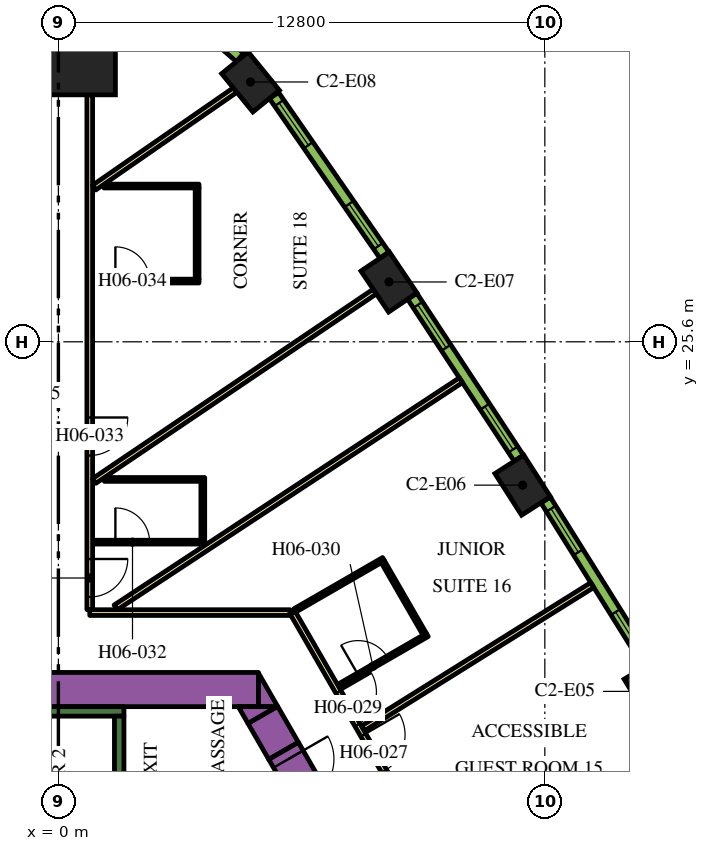
"""IFC4 building model, lengths in metres.
Left out: names, types, materials, properties, quantities, classifications, styles, units other than length and angle.
Written with IfcOpenShell. Run it as: python <this file> out.ifc"""

import sys

from ifc_helpers import new_model, si_unit, direction, frame, frame_2d, origin, origin_2d, place, context, subcontext, project, spatial, polyline, rectangle, outline, extrude, element, fill, save


model = new_model("IFC4")
c1 = context("Model", 3, precision=1e-05, world=origin(), true_north=direction((0.0, 1.0)))
c2 = subcontext(c1, "Body", "Model", "MODEL_VIEW")
j1 = project(units=[si_unit("LENGTHUNIT", "METRE"), si_unit("PLANEANGLEUNIT", "RADIAN")], contexts=[c1])
p1 = place(None, origin())
s1 = spatial("IfcSite", under=j1, at=p1, CompositionType="ELEMENT")
p2 = place(p1, origin())
s2 = spatial("IfcBuilding", under=s1, at=p2, CompositionType="ELEMENT")
p3 = place(p2, frame((0.0, 0.0, 83.7)))
s3 = spatial("IfcBuildingStorey", under=s2, at=p3, CompositionType="ELEMENT", Elevation=83.7)
p4 = place(p3, frame((0.0, 33.598, 0.0), z_axis=(0.0, 0.0, 1.0), x_axis=(0.0, 1.0, 0.0)))
e1 = element("IfcColumn", 1, at=p4, inside=s3, PredefinedType="COLUMN", context=c2, shape_type="SweptSolid", body=[
    extrude(rectangle(XDim=3.0, YDim=3.0, at=origin_2d()), origin(), (0.0, 0.0, 1.0), 3.9),
])
for number, where, z_axis, x_axis in (
    (2, (15.609, 16.402, 0.0), (0.0, 0.0, 1.0), (-0.52, 0.854, 0.0)),
    (3, (12.217, 21.828, 0.0), (0.0, 0.0, 1.0), (-0.54, 0.842, 0.0)),
    (4, (8.699, 27.174, 0.0), (0.0, 0.0, 1.0), (-0.559, 0.829, 0.0)),
    (5, (5.056, 32.437, 0.0), (0.0, 0.0, 1.0), (-0.632, 0.775, 0.0)),
):
    element("IfcColumn", number, at=place(p3, frame(where, z_axis=z_axis, x_axis=x_axis)), inside=s3, PredefinedType="COLUMN", context=c2, shape_type="SweptSolid", body=[
        extrude(rectangle(XDim=1.3, YDim=0.9, at=origin_2d()), origin(), (0.0, 0.0, 1.0), 3.9),
    ])
p5 = place(p3, frame((-4.224, 16.45, 0.0), z_axis=(0.0, 0.0, 1.0), x_axis=(1.0, 0.0, 0.0)))
e6 = element("IfcWall", 6, at=p5, inside=s3, PredefinedType="SOLIDWALL", context=c2, shape_type="SweptSolid", body=[
    extrude(rectangle(XDim=9.488, YDim=0.9, at=frame_2d((4.744, 0.0))), origin(), (0.0, 0.0, 1.0), 3.9),
])
p6 = place(p3, origin())
e7 = element("IfcWall", 7, at=p6, inside=s3, PredefinedType="SOLIDWALL", context=c2, shape_type="SweptSolid", body=[
    extrude(outline(polyline([(5.265, 16.0), (5.265, 16.88), (5.773, 16.0), (5.265, 16.0)])), origin(), (0.0, 0.0, 1.0), 3.9),
])
p7 = place(p3, frame((5.926, 14.836, 0.0), z_axis=(0.0, 0.0, 1.0), x_axis=(-0.500076735116, 0.865981096212, 0.0)))
e8 = element("IfcWall", 8, at=p7, inside=s3, PredefinedType="SOLIDWALL", context=c2, shape_type="SweptSolid", body=[
    extrude(rectangle(XDim=1.094, YDim=0.9, at=frame_2d((0.547, 0.0))), origin(), (0.0, 0.0, 1.0), 3.9),
])
e9 = element("IfcWall", 9, at=p6, inside=s3, PredefinedType="SOLIDWALL", context=c2, shape_type="SweptSolid", body=[
    extrude(outline(polyline([(4.734, 16.0), (5.75, 16.0), (4.988, 15.56), (4.734, 16.0)])), origin(), (0.0, 0.0, 1.0), 3.9),
])
p8 = place(p3, frame((-1.725, 15.875, 0.0), z_axis=(0.0, 0.0, 1.0), x_axis=(1.0, 0.0, 0.0)))
e10 = element("IfcWall", 10, at=p8, inside=s3, PredefinedType="SOLIDWALL", context=c2, shape_type="SweptSolid", body=[
    extrude(rectangle(XDim=3.45, YDim=0.25, at=frame_2d((1.725, 0.0))), origin(), (0.0, 0.0, 1.0), 3.9),
])
p9 = place(p3, frame((1.6, 8.95, 0.0), z_axis=(0.0, 0.0, 1.0), x_axis=(0.0, 1.0, 0.0)))
e11 = element("IfcWall", 11, at=p9, inside=s3, PredefinedType="SOLIDWALL", context=c2, shape_type="SweptSolid", body=[
    extrude(rectangle(XDim=6.8, YDim=0.25, at=frame_2d((3.4, 0.0))), origin(), (0.0, 0.0, 1.0), 3.9),
])
p10 = place(p3, frame((5.926, 14.836, 0.0), z_axis=(0.0, 0.0, 1.0), x_axis=(0.500062241894, -0.865989465428, 0.0)))
e12 = element("IfcWall", 12, at=p10, inside=s3, PredefinedType="SOLIDWALL", context=c2, shape_type="SweptSolid", body=[
    extrude(rectangle(XDim=1.7, YDim=0.9, at=frame_2d((0.85, 0.0))), origin(), (0.0, 0.0, 1.0), 3.9),
])
p11 = place(p10, frame((0.25, 0.0, 0.0)))
e13 = element("IfcOpeningElement", 13, at=p11, cuts=e12, PredefinedType="OPENING", context=c2, shape_type="SweptSolid", body=[
    extrude(rectangle(XDim=1.2, YDim=2.1, at=frame_2d((0.6, 1.05))), frame((0.0, 0.46, 0.0), z_axis=(0.0, -1.0, 0.0), x_axis=(1.0, 0.0, 0.0)), (0.0, 0.0, 1.0), 0.92),
])
p12 = place(p3, frame((6.163, 18.475, 0.0), z_axis=(0.0, 0.0, 1.0), x_axis=(0.500001317485, -0.866024643133, 0.0)))
e14 = element("IfcWall", 14, at=p12, inside=s3, PredefinedType="PARTITIONING", context=c2, shape_type="SweptSolid", body=[
    extrude(rectangle(XDim=25.767, YDim=0.15, at=frame_2d((12.883, 0.0))), origin(), (0.0, 0.0, 1.0), 2.75),
])
p13 = place(p12, frame((24.241, 0.0, 0.0)))
e15 = element("IfcOpeningElement", 15, at=p13, cuts=e14, PredefinedType="OPENING", context=c2, shape_type="SweptSolid", body=[
    extrude(rectangle(XDim=1.0, YDim=2.1, at=frame_2d((0.5, 1.05))), frame((0.0, 0.085, 0.0), z_axis=(0.0, -1.0, 0.0), x_axis=(1.0, 0.0, 0.0)), (0.0, 0.0, 1.0), 0.17),
])
p14 = place(p12, frame((13.144, 0.0, 0.0)))
e16 = element("IfcOpeningElement", 16, at=p14, cuts=e14, PredefinedType="OPENING", context=c2, shape_type="SweptSolid", body=[
    extrude(rectangle(XDim=1.0, YDim=2.1, at=frame_2d((0.5, 1.05))), frame((0.0, 0.085, 0.0), z_axis=(0.0, -1.0, 0.0), x_axis=(1.0, 0.0, 0.0)), (0.0, 0.0, 1.0), 0.17),
])
p15 = place(p12, frame((10.874, 0.0, 0.0)))
e17 = element("IfcOpeningElement", 17, at=p15, cuts=e14, PredefinedType="OPENING", context=c2, shape_type="SweptSolid", body=[
    extrude(rectangle(XDim=0.9, YDim=2.1, at=frame_2d((0.45, 1.05))), frame((0.0, 0.085, 0.0), z_axis=(0.0, -1.0, 0.0), x_axis=(1.0, 0.0, 0.0)), (0.0, 0.0, 1.0), 0.17),
])
p16 = place(p12, frame((3.718, 0.0, 0.0)))
e18 = element("IfcOpeningElement", 18, at=p16, cuts=e14, PredefinedType="OPENING", context=c2, shape_type="SweptSolid", body=[
    extrude(rectangle(XDim=1.1, YDim=2.1, at=frame_2d((0.55, 1.05))), frame((0.0, 0.085, 0.0), z_axis=(0.0, -1.0, 0.0), x_axis=(1.0, 0.0, 0.0)), (0.0, 0.0, 1.0), 0.17),
])
p17 = place(p12, frame((2.411, 0.0, 0.0)))
e19 = element("IfcOpeningElement", 19, at=p17, cuts=e14, PredefinedType="OPENING", context=c2, shape_type="SweptSolid", body=[
    extrude(rectangle(XDim=1.0, YDim=2.1, at=frame_2d((0.5, 1.05))), frame((0.0, 0.085, 0.0), z_axis=(0.0, -1.0, 0.0), x_axis=(1.0, 0.0, 0.0)), (0.0, 0.0, 1.0), 0.17),
])
p18 = place(p3, frame((0.825, 18.475, 0.0), z_axis=(0.0, 0.0, 1.0), x_axis=(1.0, 0.0, 0.0)))
e20 = element("IfcWall", 20, at=p18, inside=s3, PredefinedType="PARTITIONING", context=c2, shape_type="SweptSolid", body=[
    extrude(rectangle(XDim=5.268, YDim=0.15, at=frame_2d((2.634, 0.0))), origin(), (0.0, 0.0, 1.0), 2.75),
])
p19 = place(p3, frame((0.825, 32.098, 0.0), z_axis=(0.0, 0.0, 1.0), x_axis=(0.0, -1.0, 0.0)))
e21 = element("IfcWall", 21, at=p19, inside=s3, PredefinedType="PARTITIONING", context=c2, shape_type="SweptSolid", body=[
    extrude(rectangle(XDim=13.543, YDim=0.15, at=frame_2d((6.772, 0.0))), origin(), (0.0, 0.0, 1.0), 2.75),
])
p20 = place(p19, frame((12.213, 0.0, 0.0)))
e22 = element("IfcOpeningElement", 22, at=p20, cuts=e21, PredefinedType="OPENING", context=c2, shape_type="SweptSolid", body=[
    extrude(rectangle(XDim=1.0, YDim=2.1, at=frame_2d((0.5, 1.05))), frame((0.0, 0.085, 0.0), z_axis=(0.0, -1.0, 0.0), x_axis=(1.0, 0.0, 0.0)), (0.0, 0.0, 1.0), 0.17),
])
p21 = place(p19, frame((8.49, 0.0, 0.0)))
e23 = element("IfcOpeningElement", 23, at=p21, cuts=e21, PredefinedType="OPENING", context=c2, shape_type="SweptSolid", body=[
    extrude(rectangle(XDim=1.0, YDim=2.1, at=frame_2d((0.5, 1.05))), frame((0.0, 0.085, 0.0), z_axis=(0.0, -1.0, 0.0), x_axis=(1.0, 0.0, 0.0)), (0.0, 0.0, 1.0), 0.17),
])
p22 = place(p3, frame((8.326, 26.923, 0.0), z_axis=(0.0, 0.0, 1.0), x_axis=(-0.828836601893, -0.5594907393, 0.0)))
e24 = element("IfcWall", 24, at=p22, inside=s3, PredefinedType="PARTITIONING", context=c2, shape_type="SweptSolid", body=[
    extrude(rectangle(XDim=8.909, YDim=0.15, at=frame_2d((4.455, 0.0))), origin(), (0.0, 0.0, 1.0), 2.75),
])
p23 = place(p3, frame((10.592, 24.589, 0.0), z_axis=(0.0, 0.0, 1.0), x_axis=(-0.835337323748, -0.549737715236, 0.0)))
e25 = element("IfcWall", 25, at=p23, inside=s3, PredefinedType="PARTITIONING", context=c2, shape_type="SweptSolid", body=[
    extrude(rectangle(XDim=10.875, YDim=0.15, at=frame_2d((5.438, 0.0))), origin(), (0.0, 0.0, 1.0), 2.75),
])
p24 = place(p3, frame((4.649, 32.223, 0.0), z_axis=(0.0, 0.0, 1.0), x_axis=(-0.822262349475, -0.569108626394, 0.0)))
e26 = element("IfcWall", 26, at=p24, inside=s3, PredefinedType="PARTITIONING", context=c2, shape_type="SweptSolid", body=[
    extrude(rectangle(XDim=4.51, YDim=0.15, at=frame_2d((2.255, 0.0))), origin(), (0.0, 0.0, 1.0), 2.75),
])
p25 = place(p3, frame((14.049, 19.2, 0.0), z_axis=(0.0, 0.0, 1.0), x_axis=(-0.847955867271, -0.530066832731, 0.0)))
e27 = element("IfcWall", 27, at=p25, inside=s3, PredefinedType="PARTITIONING", context=c2, shape_type="SweptSolid", body=[
    extrude(rectangle(XDim=7.111, YDim=0.15, at=frame_2d((3.556, 0.0))), origin(), (0.0, 0.0, 1.0), 2.75),
])
p26 = place(p3, frame((7.368, 16.538, 0.0), z_axis=(0.0, 0.0, 1.0), x_axis=(0.866036505625, 0.499980770555, 0.0)))
e28 = element("IfcWall", 28, at=p26, inside=s3, PredefinedType="PARTITIONING", context=c2, shape_type="SweptSolid", body=[
    extrude(rectangle(XDim=2.7, YDim=0.1, at=frame_2d((1.35, 0.0))), origin(), (0.0, 0.0, 1.0), 2.75),
])
p27 = place(p26, frame((0.6, 0.0, 0.0)))
e29 = element("IfcOpeningElement", 29, at=p27, cuts=e28, PredefinedType="OPENING", context=c2, shape_type="SweptSolid", body=[
    extrude(rectangle(XDim=0.9, YDim=2.1, at=frame_2d((0.45, 1.05))), frame((0.0, 0.06, 0.0), z_axis=(0.0, -1.0, 0.0), x_axis=(1.0, 0.0, 0.0)), (0.0, 0.0, 1.0), 0.12),
])
p28 = place(p3, frame((9.638, 17.906, 0.0), z_axis=(0.0, 0.0, 1.0), x_axis=(-0.50002983664, 0.866008176907, 0.0)))
e30 = element("IfcWall", 30, at=p28, inside=s3, PredefinedType="PARTITIONING", context=c2, shape_type="SweptSolid", body=[
    extrude(rectangle(XDim=2.2, YDim=0.1, at=frame_2d((1.1, 0.0))), origin(), (0.0, 0.0, 1.0), 2.75),
])
p29 = place(p3, frame((6.218, 18.53, 0.0), z_axis=(0.0, 0.0, 1.0), x_axis=(0.86599734893, 0.500048589285, 0.0)))
e31 = element("IfcWall", 31, at=p29, inside=s3, PredefinedType="PARTITIONING", context=c2, shape_type="SweptSolid", body=[
    extrude(rectangle(XDim=2.7, YDim=0.1, at=frame_2d((1.35, 0.0))), origin(), (0.0, 0.0, 1.0), 2.75),
])
p30 = place(p3, frame((0.9, 20.329, 0.0), z_axis=(0.0, 0.0, 1.0), x_axis=(1.0, 0.0, 0.0)))
e32 = element("IfcWall", 32, at=p30, inside=s3, PredefinedType="PARTITIONING", context=c2, shape_type="SweptSolid", body=[
    extrude(rectangle(XDim=2.95, YDim=0.1, at=frame_2d((1.475, 0.0))), origin(), (0.0, 0.0, 1.0), 2.75),
])
p31 = place(p30, frame((0.6, 0.0, 0.0)))
e33 = element("IfcOpeningElement", 33, at=p31, cuts=e32, PredefinedType="OPENING", context=c2, shape_type="SweptSolid", body=[
    extrude(rectangle(XDim=0.9, YDim=2.1, at=frame_2d((0.45, 1.05))), frame((0.0, 0.06, 0.0), z_axis=(0.0, -1.0, 0.0), x_axis=(1.0, 0.0, 0.0)), (0.0, 0.0, 1.0), 0.12),
])
p32 = place(p3, frame((3.8, 20.378, 0.0), z_axis=(0.0, 0.0, 1.0), x_axis=(0.0, 1.0, 0.0)))
e34 = element("IfcWall", 34, at=p32, inside=s3, PredefinedType="PARTITIONING", context=c2, shape_type="SweptSolid", body=[
    extrude(rectangle(XDim=1.55, YDim=0.1, at=frame_2d((0.775, 0.0))), origin(), (0.0, 0.0, 1.0), 2.75),
])
p33 = place(p3, frame((1.21, 21.979, 0.0), z_axis=(0.0, 0.0, 1.0), x_axis=(1.0, 0.0, 0.0)))
e35 = element("IfcWall", 35, at=p33, inside=s3, PredefinedType="PARTITIONING", context=c2, shape_type="SweptSolid", body=[
    extrude(rectangle(XDim=2.64, YDim=0.1, at=frame_2d((1.32, 0.0))), origin(), (0.0, 0.0, 1.0), 2.75),
])
p34 = place(p3, frame((0.9, 27.198, 0.0), z_axis=(0.0, 0.0, 1.0), x_axis=(1.0, 0.0, 0.0)))
e36 = element("IfcWall", 36, at=p34, inside=s3, PredefinedType="PARTITIONING", context=c2, shape_type="SweptSolid", body=[
    extrude(rectangle(XDim=2.8, YDim=0.1, at=frame_2d((1.4, 0.0))), origin(), (0.0, 0.0, 1.0), 2.75),
])
p35 = place(p34, frame((0.6, 0.0, 0.0)))
e37 = element("IfcOpeningElement", 37, at=p35, cuts=e36, PredefinedType="OPENING", context=c2, shape_type="SweptSolid", body=[
    extrude(rectangle(XDim=0.9, YDim=2.1, at=frame_2d((0.45, 1.05))), frame((0.0, 0.06, 0.0), z_axis=(0.0, -1.0, 0.0), x_axis=(1.0, 0.0, 0.0)), (0.0, 0.0, 1.0), 0.12),
])
p36 = place(p3, frame((3.65, 27.248, 0.0), z_axis=(0.0, 0.0, 1.0), x_axis=(0.0, 1.0, 0.0)))
e38 = element("IfcWall", 38, at=p36, inside=s3, PredefinedType="PARTITIONING", context=c2, shape_type="SweptSolid", body=[
    extrude(rectangle(XDim=2.4, YDim=0.1, at=frame_2d((1.2, 0.0))), origin(), (0.0, 0.0, 1.0), 2.75),
])
p37 = place(p3, frame((1.2, 29.698, 0.0), z_axis=(0.0, 0.0, 1.0), x_axis=(1.0, 0.0, 0.0)))
e39 = element("IfcWall", 39, at=p37, inside=s3, PredefinedType="PARTITIONING", context=c2, shape_type="SweptSolid", body=[
    extrude(rectangle(XDim=2.5, YDim=0.1, at=frame_2d((1.25, 0.0))), origin(), (0.0, 0.0, 1.0), 2.75),
])
p38 = place(p3, frame((15.524, 17.114, 0.0), z_axis=(0.0, 0.0, 1.0), x_axis=(-0.530072082134, 0.847952585787, 0.0)))
e40 = element("IfcWall", 40, at=p38, inside=s3, PredefinedType="SOLIDWALL", context=c2, shape_type="SweptSolid", body=[
    extrude(rectangle(XDim=5.1, YDim=0.29, at=frame_2d((2.55, 0.0))), origin(), (0.0, 0.0, 1.0), 3.65),
])
p39 = place(p38, frame((0.273, 0.0, 0.9)))
e41 = element("IfcOpeningElement", 41, at=p39, cuts=e40, PredefinedType="OPENING", context=c2, shape_type="SweptSolid", body=[
    extrude(rectangle(XDim=1.35, YDim=2.15, at=frame_2d((0.675, 1.075))), frame((0.0, 0.155, 0.0), z_axis=(0.0, -1.0, 0.0), x_axis=(1.0, 0.0, 0.0)), (0.0, 0.0, 1.0), 0.31),
])
p40 = place(p38, frame((3.478, 0.0, 0.9)))
e42 = element("IfcOpeningElement", 42, at=p40, cuts=e40, PredefinedType="OPENING", context=c2, shape_type="SweptSolid", body=[
    extrude(rectangle(XDim=1.35, YDim=2.15, at=frame_2d((0.675, 1.075))), frame((0.0, 0.155, 0.0), z_axis=(0.0, -1.0, 0.0), x_axis=(1.0, 0.0, 0.0)), (0.0, 0.0, 1.0), 0.31),
])
p41 = place(p3, frame((12.115, 22.539, 0.0), z_axis=(0.0, 0.0, 1.0), x_axis=(-0.549741341923, 0.835334937005, 0.0)))
e43 = element("IfcWall", 43, at=p41, inside=s3, PredefinedType="SOLIDWALL", context=c2, shape_type="SweptSolid", body=[
    extrude(rectangle(XDim=5.1, YDim=0.29, at=frame_2d((2.55, 0.0))), origin(), (0.0, 0.0, 1.0), 3.65),
])
p42 = place(p41, frame((0.273, 0.0, 0.9)))
e44 = element("IfcOpeningElement", 44, at=p42, cuts=e43, PredefinedType="OPENING", context=c2, shape_type="SweptSolid", body=[
    extrude(rectangle(XDim=1.35, YDim=2.15, at=frame_2d((0.675, 1.075))), frame((0.0, 0.155, 0.0), z_axis=(0.0, -1.0, 0.0), x_axis=(1.0, 0.0, 0.0)), (0.0, 0.0, 1.0), 0.31),
])
p43 = place(p41, frame((3.478, 0.0, 0.9)))
e45 = element("IfcOpeningElement", 45, at=p43, cuts=e43, PredefinedType="OPENING", context=c2, shape_type="SweptSolid", body=[
    extrude(rectangle(XDim=1.35, YDim=2.15, at=frame_2d((0.675, 1.075))), frame((0.0, 0.155, 0.0), z_axis=(0.0, -1.0, 0.0), x_axis=(1.0, 0.0, 0.0)), (0.0, 0.0, 1.0), 0.31),
])
p44 = place(p3, frame((8.58, 27.882, 0.0), z_axis=(0.0, 0.0, 1.0), x_axis=(-0.569113019126, 0.822259309136, 0.0)))
e46 = element("IfcWall", 46, at=p44, inside=s3, PredefinedType="SOLIDWALL", context=c2, shape_type="SweptSolid", body=[
    extrude(rectangle(XDim=5.107, YDim=0.29, at=frame_2d((2.553, 0.0))), origin(), (0.0, 0.0, 1.0), 3.65),
])
p45 = place(p44, frame((0.285, 0.0, 0.9)))
e47 = element("IfcOpeningElement", 47, at=p45, cuts=e46, PredefinedType="OPENING", context=c2, shape_type="SweptSolid", body=[
    extrude(rectangle(XDim=1.35, YDim=2.15, at=frame_2d((0.675, 1.075))), frame((0.0, 0.155, 0.0), z_axis=(0.0, -1.0, 0.0), x_axis=(1.0, 0.0, 0.0)), (0.0, 0.0, 1.0), 0.31),
])
p46 = place(p44, frame((3.516, 0.0, 0.9)))
e48 = element("IfcOpeningElement", 48, at=p46, cuts=e46, PredefinedType="OPENING", context=c2, shape_type="SweptSolid", body=[
    extrude(rectangle(XDim=1.35, YDim=2.15, at=frame_2d((0.675, 1.075))), frame((0.0, 0.155, 0.0), z_axis=(0.0, -1.0, 0.0), x_axis=(1.0, 0.0, 0.0)), (0.0, 0.0, 1.0), 0.31),
])
p47 = place(p3, frame((4.778, 33.082, 0.0), z_axis=(0.0, 0.0, 1.0), x_axis=(-0.754882764627, 0.655859749999, 0.0)))
e49 = element("IfcWall", 49, at=p47, inside=s3, PredefinedType="SOLIDWALL", context=c2, shape_type="SweptSolid", body=[
    extrude(rectangle(XDim=1.82, YDim=0.29, at=frame_2d((0.91, 0.0))), origin(), (0.0, 0.0, 1.0), 3.65),
])
p48 = place(p47, frame((0.46, 0.0, 0.9)))
e50 = element("IfcOpeningElement", 50, at=p48, cuts=e49, PredefinedType="OPENING", context=c2, shape_type="SweptSolid", body=[
    extrude(rectangle(XDim=0.9, YDim=2.15, at=frame_2d((0.45, 1.075))), frame((0.0, 0.155, 0.0), z_axis=(0.0, -1.0, 0.0), x_axis=(1.0, 0.0, 0.0)), (0.0, 0.0, 1.0), 0.31),
])
p49 = place(p11, origin())
e51 = element("IfcDoor", 51, at=p49, inside=s3, OperationType="SINGLE_SWING_LEFT", PredefinedType="DOOR", context=c2, shape_type="SweptSolid", body=[
    extrude(rectangle(XDim=1.2, YDim=2.1, at=frame_2d((0.6, 1.05))), frame((0.0, 0.025, 0.0), z_axis=(0.0, -1.0, 0.0), x_axis=(1.0, 0.0, 0.0)), (0.0, 0.0, 1.0), 0.05),
])
fill(e13, e51)
p50 = place(p16, origin())
e52 = element("IfcDoor", 52, at=p50, inside=s3, OperationType="SINGLE_SWING_LEFT", PredefinedType="DOOR", context=c2, shape_type="SweptSolid", body=[
    extrude(rectangle(XDim=1.1, YDim=2.1, at=frame_2d((0.55, 1.05))), frame((0.0, 0.025, 0.0), z_axis=(0.0, -1.0, 0.0), x_axis=(1.0, 0.0, 0.0)), (0.0, 0.0, 1.0), 0.05),
])
fill(e18, e52)
p51 = place(p17, origin())
e53 = element("IfcDoor", 53, at=p51, inside=s3, OperationType="SINGLE_SWING_RIGHT", PredefinedType="DOOR", context=c2, shape_type="SweptSolid", body=[
    extrude(rectangle(XDim=1.0, YDim=2.1, at=frame_2d((0.5, 1.05))), frame((0.0, 0.025, 0.0), z_axis=(0.0, -1.0, 0.0), x_axis=(1.0, 0.0, 0.0)), (0.0, 0.0, 1.0), 0.05),
])
fill(e19, e53)
p52 = place(p27, origin())
e54 = element("IfcDoor", 54, at=p52, inside=s3, OperationType="SINGLE_SWING_LEFT", PredefinedType="DOOR", context=c2, shape_type="SweptSolid", body=[
    extrude(rectangle(XDim=0.9, YDim=2.1, at=frame_2d((0.45, 1.05))), frame((0.0, 0.025, 0.0), z_axis=(0.0, -1.0, 0.0), x_axis=(1.0, 0.0, 0.0)), (0.0, 0.0, 1.0), 0.05),
])
fill(e29, e54)
p53 = place(p20, origin())
e55 = element("IfcDoor", 55, at=p53, inside=s3, OperationType="SINGLE_SWING_RIGHT", PredefinedType="DOOR", context=c2, shape_type="SweptSolid", body=[
    extrude(rectangle(XDim=1.0, YDim=2.1, at=frame_2d((0.5, 1.05))), frame((0.0, 0.025, 0.0), z_axis=(0.0, -1.0, 0.0), x_axis=(1.0, 0.0, 0.0)), (0.0, 0.0, 1.0), 0.05),
])
fill(e22, e55)
p54 = place(p31, origin())
e56 = element("IfcDoor", 56, at=p54, inside=s3, OperationType="SINGLE_SWING_LEFT", PredefinedType="DOOR", context=c2, shape_type="SweptSolid", body=[
    extrude(rectangle(XDim=0.9, YDim=2.1, at=frame_2d((0.45, 1.05))), frame((0.0, 0.025, 0.0), z_axis=(0.0, -1.0, 0.0), x_axis=(1.0, 0.0, 0.0)), (0.0, 0.0, 1.0), 0.05),
])
fill(e33, e56)
p55 = place(p21, origin())
e57 = element("IfcDoor", 57, at=p55, inside=s3, OperationType="SINGLE_SWING_RIGHT", PredefinedType="DOOR", context=c2, shape_type="SweptSolid", body=[
    extrude(rectangle(XDim=1.0, YDim=2.1, at=frame_2d((0.5, 1.05))), frame((0.0, 0.025, 0.0), z_axis=(0.0, -1.0, 0.0), x_axis=(1.0, 0.0, 0.0)), (0.0, 0.0, 1.0), 0.05),
])
fill(e23, e57)
p56 = place(p35, origin())
e58 = element("IfcDoor", 58, at=p56, inside=s3, OperationType="SINGLE_SWING_RIGHT", PredefinedType="DOOR", context=c2, shape_type="SweptSolid", body=[
    extrude(rectangle(XDim=0.9, YDim=2.1, at=frame_2d((0.45, 1.05))), frame((0.0, 0.025, 0.0), z_axis=(0.0, -1.0, 0.0), x_axis=(1.0, 0.0, 0.0)), (0.0, 0.0, 1.0), 0.05),
])
fill(e37, e58)
p57 = place(p39, origin())
e59 = element("IfcWindow", 59, at=p57, inside=s3, PartitioningType="DOUBLE_PANEL_VERTICAL", PredefinedType="WINDOW", context=c2, shape_type="SweptSolid", body=[
    extrude(rectangle(XDim=1.35, YDim=2.15, at=frame_2d((0.675, 1.075))), frame((0.0, 0.015, 0.0), z_axis=(0.0, -1.0, 0.0), x_axis=(1.0, 0.0, 0.0)), (0.0, 0.0, 1.0), 0.06),
])
fill(e41, e59)
p58 = place(p40, origin())
e60 = element("IfcWindow", 60, at=p58, inside=s3, PartitioningType="DOUBLE_PANEL_VERTICAL", PredefinedType="WINDOW", context=c2, shape_type="SweptSolid", body=[
    extrude(rectangle(XDim=1.35, YDim=2.15, at=frame_2d((0.675, 1.075))), frame((0.0, 0.015, 0.0), z_axis=(0.0, -1.0, 0.0), x_axis=(1.0, 0.0, 0.0)), (0.0, 0.0, 1.0), 0.06),
])
fill(e42, e60)
p59 = place(p42, origin())
e61 = element("IfcWindow", 61, at=p59, inside=s3, PartitioningType="DOUBLE_PANEL_VERTICAL", PredefinedType="WINDOW", context=c2, shape_type="SweptSolid", body=[
    extrude(rectangle(XDim=1.35, YDim=2.15, at=frame_2d((0.675, 1.075))), frame((0.0, 0.015, 0.0), z_axis=(0.0, -1.0, 0.0), x_axis=(1.0, 0.0, 0.0)), (0.0, 0.0, 1.0), 0.06),
])
fill(e44, e61)
p60 = place(p43, origin())
e62 = element("IfcWindow", 62, at=p60, inside=s3, PartitioningType="DOUBLE_PANEL_VERTICAL", PredefinedType="WINDOW", context=c2, shape_type="SweptSolid", body=[
    extrude(rectangle(XDim=1.35, YDim=2.15, at=frame_2d((0.675, 1.075))), frame((0.0, 0.015, 0.0), z_axis=(0.0, -1.0, 0.0), x_axis=(1.0, 0.0, 0.0)), (0.0, 0.0, 1.0), 0.06),
])
fill(e45, e62)
p61 = place(p45, origin())
e63 = element("IfcWindow", 63, at=p61, inside=s3, PartitioningType="DOUBLE_PANEL_VERTICAL", PredefinedType="WINDOW", context=c2, shape_type="SweptSolid", body=[
    extrude(rectangle(XDim=1.35, YDim=2.15, at=frame_2d((0.675, 1.075))), frame((0.0, 0.015, 0.0), z_axis=(0.0, -1.0, 0.0), x_axis=(1.0, 0.0, 0.0)), (0.0, 0.0, 1.0), 0.06),
])
fill(e47, e63)
p62 = place(p46, origin())
e64 = element("IfcWindow", 64, at=p62, inside=s3, PartitioningType="DOUBLE_PANEL_VERTICAL", PredefinedType="WINDOW", context=c2, shape_type="SweptSolid", body=[
    extrude(rectangle(XDim=1.35, YDim=2.15, at=frame_2d((0.675, 1.075))), frame((0.0, 0.015, 0.0), z_axis=(0.0, -1.0, 0.0), x_axis=(1.0, 0.0, 0.0)), (0.0, 0.0, 1.0), 0.06),
])
fill(e48, e64)
save(model, sys.argv[1])
